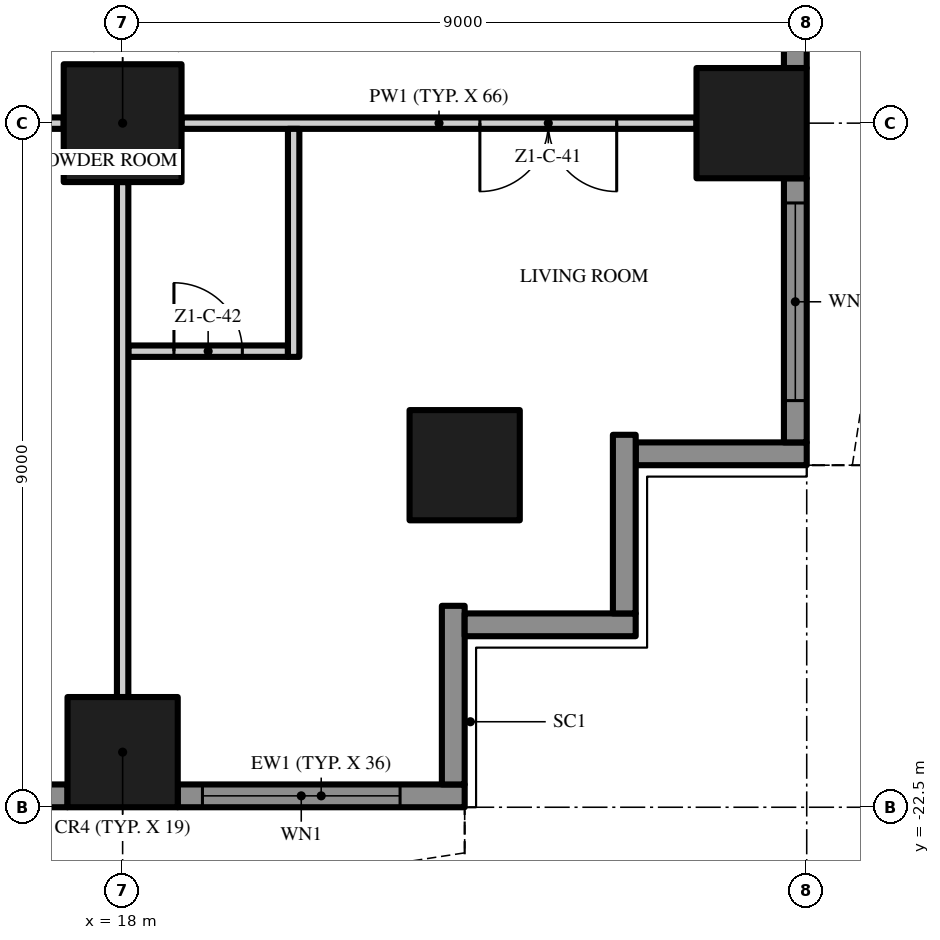
"""IFC4 building model, lengths in metres.
Left out: names, types, materials, properties, quantities, classifications, styles, units other than length and angle.
Written with IfcOpenShell. Run it as: python <this file> out.ifc"""

import sys

from ifc_helpers import new_model, si_unit, direction, frame, frame_2d, origin, origin_2d, place, context, subcontext, project, spatial, polyline, rectangle, outline, extrude, element, fill, save


model = new_model("IFC4")
c1 = context("Model", 3, precision=1e-05, world=origin(), true_north=direction((0.0, 1.0)))
c2 = subcontext(c1, "Body", "Model", "MODEL_VIEW")
j1 = project(units=[si_unit("LENGTHUNIT", "METRE"), si_unit("PLANEANGLEUNIT", "RADIAN")], contexts=[c1])
p1 = place(None, origin())
s1 = spatial("IfcSite", under=j1, at=p1, CompositionType="ELEMENT")
p2 = place(p1, origin())
s2 = spatial("IfcBuilding", under=s1, at=p2, CompositionType="ELEMENT")
p3 = place(p2, frame((0.0, 0.0, 37.8)))
s3 = spatial("IfcBuildingStorey", under=s2, at=p3, CompositionType="ELEMENT", Elevation=37.8)
p4 = place(p3, frame((18.0, -13.5, 0.0), z_axis=(0.0, 0.0, 1.0), x_axis=(1.0, 0.0, 0.0)))
e1 = element("IfcColumn", 1, at=p4, inside=s3, PredefinedType="COLUMN", context=c2, shape_type="SweptSolid", body=[
    extrude(rectangle(XDim=1.55, YDim=1.55, at=origin_2d()), origin(), (0.0, 0.0, 1.0), 3.5),
])
for number, where, z_axis, x_axis in (
    (2, (18.0, -21.775, 0.0), (0.0, 0.0, 1.0), (1.0, 0.0, 0.0)),
    (3, (26.275, -13.5, 0.0), (0.0, 0.0, 1.0), (1.0, 0.0, 0.0)),
    (4, (22.5, -18.0, 0.0), (0.0, 0.0, 1.0), (1.0, 0.0, 0.0)),
):
    element("IfcColumn", number, at=place(p3, frame(where, z_axis=z_axis, x_axis=x_axis)), inside=s3, PredefinedType="COLUMN", context=c2, shape_type="SweptSolid", body=[
        extrude(rectangle(XDim=1.45, YDim=1.45, at=origin_2d()), origin(), (0.0, 0.0, 1.0), 3.5),
    ])
p5 = place(p3, frame((17.275, -22.35, 0.0), z_axis=(0.0, 0.0, 1.0), x_axis=(-1.0, 0.0, 0.0)))
e5 = element("IfcWall", 5, at=p5, inside=s3, PredefinedType="SOLIDWALL", context=c2, shape_type="SweptSolid", body=[
    extrude(rectangle(XDim=7.55, YDim=0.3, at=frame_2d((3.775, 0.0))), origin(), (0.0, 0.0, 1.0), 3.5),
])
p6 = place(p5, frame((4.625, 0.0, 0.45)))
e6 = element("IfcOpeningElement", 6, at=p6, cuts=e5, PredefinedType="OPENING", context=c2, shape_type="SweptSolid", body=[
    extrude(rectangle(XDim=2.6, YDim=2.65, at=frame_2d((1.3, 1.325))), frame((0.0, 0.16, 0.0), z_axis=(0.0, -1.0, 0.0), x_axis=(1.0, 0.0, 0.0)), (0.0, 0.0, 1.0), 0.32),
])
p7 = place(p5, frame((0.325, 0.0, 0.0)))
e7 = element("IfcOpeningElement", 7, at=p7, cuts=e5, PredefinedType="OPENING", context=c2, shape_type="SweptSolid", body=[
    extrude(rectangle(XDim=2.6, YDim=2.4, at=frame_2d((1.3, 1.2))), frame((0.0, 0.16, 0.0), z_axis=(0.0, -1.0, 0.0), x_axis=(1.0, 0.0, 0.0)), (0.0, 0.0, 1.0), 0.32),
])
p8 = place(p3, frame((22.5, -22.35, 0.0), z_axis=(0.0, 0.0, 1.0), x_axis=(-1.0, 0.0, 0.0)))
e8 = element("IfcWall", 8, at=p8, inside=s3, PredefinedType="SOLIDWALL", context=c2, shape_type="SweptSolid", body=[
    extrude(rectangle(XDim=3.775, YDim=0.3, at=frame_2d((1.887, 0.0))), origin(), (0.0, 0.0, 1.0), 3.5),
])
p9 = place(p8, frame((0.85, 0.0, 0.45)))
e9 = element("IfcOpeningElement", 9, at=p9, cuts=e8, PredefinedType="OPENING", context=c2, shape_type="SweptSolid", body=[
    extrude(rectangle(XDim=2.6, YDim=2.65, at=frame_2d((1.3, 1.325))), frame((0.0, 0.16, 0.0), z_axis=(0.0, -1.0, 0.0), x_axis=(1.0, 0.0, 0.0)), (0.0, 0.0, 1.0), 0.32),
])
p10 = place(p3, frame((22.35, -19.85, 0.0), z_axis=(0.0, 0.0, 1.0), x_axis=(0.0, -1.0, 0.0)))
e10 = element("IfcWall", 10, at=p10, inside=s3, PredefinedType="SOLIDWALL", context=c2, shape_type="SweptSolid", body=[
    extrude(rectangle(XDim=2.35, YDim=0.3, at=frame_2d((1.175, 0.0))), origin(), (0.0, 0.0, 1.0), 3.5),
])
p11 = place(p3, frame((24.75, -20.1, 0.0), z_axis=(0.0, 0.0, 1.0), x_axis=(-1.0, 0.0, 0.0)))
e11 = element("IfcWall", 11, at=p11, inside=s3, PredefinedType="SOLIDWALL", context=c2, shape_type="SweptSolid", body=[
    extrude(rectangle(XDim=2.25, YDim=0.3, at=frame_2d((1.125, 0.0))), origin(), (0.0, 0.0, 1.0), 3.5),
])
p12 = place(p3, frame((24.6, -17.6, 0.0), z_axis=(0.0, 0.0, 1.0), x_axis=(0.0, -1.0, 0.0)))
e12 = element("IfcWall", 12, at=p12, inside=s3, PredefinedType="SOLIDWALL", context=c2, shape_type="SweptSolid", body=[
    extrude(rectangle(XDim=2.35, YDim=0.3, at=frame_2d((1.175, 0.0))), origin(), (0.0, 0.0, 1.0), 3.5),
])
p13 = place(p3, frame((27.0, -17.85, 0.0), z_axis=(0.0, 0.0, 1.0), x_axis=(-1.0, 0.0, 0.0)))
e13 = element("IfcWall", 13, at=p13, inside=s3, PredefinedType="SOLIDWALL", context=c2, shape_type="SweptSolid", body=[
    extrude(rectangle(XDim=2.25, YDim=0.3, at=frame_2d((1.125, 0.0))), origin(), (0.0, 0.0, 1.0), 3.5),
])
p14 = place(p3, frame((26.85, -14.225, 0.0), z_axis=(0.0, 0.0, 1.0), x_axis=(0.0, -1.0, 0.0)))
e14 = element("IfcWall", 14, at=p14, inside=s3, PredefinedType="SOLIDWALL", context=c2, shape_type="SweptSolid", body=[
    extrude(rectangle(XDim=3.475, YDim=0.3, at=frame_2d((1.738, 0.0))), origin(), (0.0, 0.0, 1.0), 3.5),
])
p15 = place(p14, frame((0.325, 0.0, 0.45)))
e15 = element("IfcOpeningElement", 15, at=p15, cuts=e14, PredefinedType="OPENING", context=c2, shape_type="SweptSolid", body=[
    extrude(rectangle(XDim=2.6, YDim=2.65, at=frame_2d((1.3, 1.325))), frame((0.0, 0.16, 0.0), z_axis=(0.0, -1.0, 0.0), x_axis=(1.0, 0.0, 0.0)), (0.0, 0.0, 1.0), 0.32),
])
p16 = place(p3, frame((26.85, -5.225, 0.0), z_axis=(0.0, 0.0, 1.0), x_axis=(0.0, -1.0, 0.0)))
e16 = element("IfcWall", 16, at=p16, inside=s3, PredefinedType="SOLIDWALL", context=c2, shape_type="SweptSolid", body=[
    extrude(rectangle(XDim=7.55, YDim=0.3, at=frame_2d((3.775, 0.0))), origin(), (0.0, 0.0, 1.0), 3.5),
])
p17 = place(p16, frame((4.625, 0.0, 0.0)))
e17 = element("IfcOpeningElement", 17, at=p17, cuts=e16, PredefinedType="OPENING", context=c2, shape_type="SweptSolid", body=[
    extrude(rectangle(XDim=2.6, YDim=2.4, at=frame_2d((1.3, 1.2))), frame((0.0, 0.16, 0.0), z_axis=(0.0, -1.0, 0.0), x_axis=(1.0, 0.0, 0.0)), (0.0, 0.0, 1.0), 0.32),
])
p18 = place(p16, frame((0.325, 0.0, 0.45)))
e18 = element("IfcOpeningElement", 18, at=p18, cuts=e16, PredefinedType="OPENING", context=c2, shape_type="SweptSolid", body=[
    extrude(rectangle(XDim=2.6, YDim=2.65, at=frame_2d((1.3, 1.325))), frame((0.0, 0.16, 0.0), z_axis=(0.0, -1.0, 0.0), x_axis=(1.0, 0.0, 0.0)), (0.0, 0.0, 1.0), 0.32),
])
p19 = place(p3, origin())
e19 = element("IfcWall", 19, at=p19, inside=s3, PredefinedType="USERDEFINED", context=c2, shape_type="SweptSolid", body=[
    extrude(outline(polyline([(-22.5, -23.1), (-21.0, -23.329), (-19.5, -23.929), (-18.0, -24.671), (-16.5, -25.271), (-15.0, -25.5), (-13.5, -25.271), (-12.0, -24.671), (-10.5, -23.929), (-9.0, -23.329), (-7.5, -23.1), (-6.0, -23.329), (-4.5, -23.929), (-3.0, -24.671), (-1.5, -25.271), (0.0, -25.5), (1.5, -25.271), (3.0, -24.671), (4.5, -23.929), (6.0, -23.329), (7.5, -23.1), (9.0, -23.329), (10.5, -23.929), (12.0, -24.671), (13.5, -25.271), (15.0, -25.5), (16.5, -25.271), (18.0, -24.671), (19.5, -23.929), (21.0, -23.329), (22.5, -23.1), (22.462, -22.853), (20.934, -23.086), (19.398, -23.701), (17.898, -24.442), (16.434, -25.028), (15.0, -25.247), (13.566, -25.028), (12.102, -24.442), (10.602, -23.701), (9.066, -23.086), (7.5, -22.847), (5.934, -23.086), (4.398, -23.701), (2.898, -24.442), (1.434, -25.028), (0.0, -25.247), (-1.434, -25.028), (-2.898, -24.442), (-4.398, -23.701), (-5.934, -23.086), (-7.5, -22.847), (-9.066, -23.086), (-10.602, -23.701), (-12.102, -24.442), (-13.566, -25.028), (-15.0, -25.247), (-16.434, -25.028), (-17.898, -24.442), (-19.398, -23.701), (-20.934, -23.086), (-22.462, -22.853), (-22.5, -23.1)])), origin(), (0.0, 0.0, 1.0), 0.9),
])
p20 = place(p3, origin())
e20 = element("IfcWall", 20, at=p20, inside=s3, PredefinedType="USERDEFINED", context=c2, shape_type="SweptSolid", body=[
    extrude(outline(polyline([(27.6, -18.0), (27.829, -16.5), (28.429, -15.0), (29.171, -13.5), (29.771, -12.0), (30.0, -10.5), (29.771, -9.0), (29.171, -7.5), (28.429, -6.0), (27.829, -4.5), (27.6, -3.0), (27.829, -1.5), (28.429, 0.0), (29.171, 1.5), (29.771, 3.0), (30.0, 4.5), (29.771, 6.0), (29.171, 7.5), (28.429, 9.0), (27.829, 10.5), (27.6, 12.0), (27.829, 13.5), (28.429, 15.0), (29.171, 16.5), (29.771, 18.0), (29.539, 18.093), (28.942, 16.602), (28.201, 15.102), (27.586, 13.566), (27.347, 12.0), (27.586, 10.434), (28.201, 8.898), (28.942, 7.398), (29.528, 5.934), (29.747, 4.5), (29.528, 3.066), (28.942, 1.602), (28.201, 0.102), (27.586, -1.434), (27.347, -3.0), (27.586, -4.566), (28.201, -6.102), (28.942, -7.602), (29.528, -9.066), (29.747, -10.5), (29.528, -11.934), (28.942, -13.398), (28.201, -14.898), (27.586, -16.434), (27.353, -17.962), (27.6, -18.0)])), origin(), (0.0, 0.0, 1.0), 0.9),
])
p21 = place(p3, frame((18.075, -16.5, 0.0), z_axis=(0.0, 0.0, 1.0), x_axis=(1.0, 0.0, 0.0)))
e21 = element("IfcWall", 21, at=p21, inside=s3, PredefinedType="PARTITIONING", context=c2, shape_type="SweptSolid", body=[
    extrude(rectangle(XDim=2.1, YDim=0.15, at=frame_2d((1.05, 0.0))), origin(), (0.0, 0.0, 1.0), 3.5),
])
p22 = place(p21, frame((0.6, 0.0, 0.0)))
e22 = element("IfcOpeningElement", 22, at=p22, cuts=e21, PredefinedType="OPENING", context=c2, shape_type="SweptSolid", body=[
    extrude(rectangle(XDim=0.9, YDim=2.1, at=frame_2d((0.45, 1.05))), frame((0.0, 0.085, 0.0), z_axis=(0.0, -1.0, 0.0), x_axis=(1.0, 0.0, 0.0)), (0.0, 0.0, 1.0), 0.17),
])
p23 = place(p3, frame((17.225, -13.5, 0.0), z_axis=(0.0, 0.0, 1.0), x_axis=(-1.0, 0.0, 0.0)))
e23 = element("IfcWall", 23, at=p23, inside=s3, PredefinedType="PARTITIONING", context=c2, shape_type="SweptSolid", body=[
    extrude(rectangle(XDim=7.45, YDim=0.15, at=frame_2d((3.725, 0.0))), origin(), (0.0, 0.0, 1.0), 3.5),
])
p24 = place(p23, frame((5.25, 0.0, 0.0)))
e24 = element("IfcOpeningElement", 24, at=p24, cuts=e23, PredefinedType="OPENING", context=c2, shape_type="SweptSolid", body=[
    extrude(rectangle(XDim=1.5, YDim=2.4, at=frame_2d((0.75, 1.2))), frame((0.0, 0.085, 0.0), z_axis=(0.0, -1.0, 0.0), x_axis=(1.0, 0.0, 0.0)), (0.0, 0.0, 1.0), 0.17),
])
p25 = place(p3, frame((25.55, -13.5, 0.0), z_axis=(0.0, 0.0, 1.0), x_axis=(-1.0, 0.0, 0.0)))
e25 = element("IfcWall", 25, at=p25, inside=s3, PredefinedType="PARTITIONING", context=c2, shape_type="SweptSolid", body=[
    extrude(rectangle(XDim=6.775, YDim=0.15, at=frame_2d((3.388, 0.0))), origin(), (0.0, 0.0, 1.0), 3.5),
])
p26 = place(p25, frame((1.05, 0.0, 0.0)))
e26 = element("IfcOpeningElement", 26, at=p26, cuts=e25, PredefinedType="OPENING", context=c2, shape_type="SweptSolid", body=[
    extrude(rectangle(XDim=1.8, YDim=2.4, at=frame_2d((0.9, 1.2))), frame((0.0, 0.085, 0.0), z_axis=(0.0, -1.0, 0.0), x_axis=(1.0, 0.0, 0.0)), (0.0, 0.0, 1.0), 0.17),
])
p27 = place(p3, frame((18.0, -21.05, 0.0), z_axis=(0.0, 0.0, 1.0), x_axis=(0.0, 1.0, 0.0)))
e27 = element("IfcWall", 27, at=p27, inside=s3, PredefinedType="PARTITIONING", context=c2, shape_type="SweptSolid", body=[
    extrude(rectangle(XDim=6.775, YDim=0.15, at=frame_2d((3.388, 0.0))), origin(), (0.0, 0.0, 1.0), 3.5),
])
p28 = place(p3, frame((20.25, -16.575, 0.0), z_axis=(0.0, 0.0, 1.0), x_axis=(0.0, 1.0, 0.0)))
e28 = element("IfcWall", 28, at=p28, inside=s3, PredefinedType="PARTITIONING", context=c2, shape_type="SweptSolid", body=[
    extrude(rectangle(XDim=3.0, YDim=0.15, at=frame_2d((1.5, 0.0))), origin(), (0.0, 0.0, 1.0), 3.5),
])
p29 = place(p9, origin())
e29 = element("IfcWindow", 29, at=p29, inside=s3, PartitioningType="SINGLE_PANEL", PredefinedType="WINDOW", context=c2, shape_type="SweptSolid", body=[
    extrude(rectangle(XDim=2.6, YDim=2.65, at=frame_2d((1.3, 1.325))), frame((0.0, 0.03, 0.0), z_axis=(0.0, -1.0, 0.0), x_axis=(1.0, 0.0, 0.0)), (0.0, 0.0, 1.0), 0.06),
])
fill(e9, e29)
p30 = place(p15, origin())
e30 = element("IfcWindow", 30, at=p30, inside=s3, PartitioningType="SINGLE_PANEL", PredefinedType="WINDOW", context=c2, shape_type="SweptSolid", body=[
    extrude(rectangle(XDim=2.6, YDim=2.65, at=frame_2d((1.3, 1.325))), frame((0.0, 0.03, 0.0), z_axis=(0.0, -1.0, 0.0), x_axis=(1.0, 0.0, 0.0)), (0.0, 0.0, 1.0), 0.06),
])
fill(e15, e30)
p31 = place(p26, origin())
e31 = element("IfcDoor", 31, at=p31, inside=s3, OperationType="DOUBLE_DOOR_SINGLE_SWING", PredefinedType="DOOR", context=c2, shape_type="SweptSolid", body=[
    extrude(rectangle(XDim=1.8, YDim=2.4, at=frame_2d((0.9, 1.2))), frame((0.0, 0.025, 0.0), z_axis=(0.0, -1.0, 0.0), x_axis=(1.0, 0.0, 0.0)), (0.0, 0.0, 1.0), 0.05),
])
fill(e26, e31)
p32 = place(p22, origin())
e32 = element("IfcDoor", 32, at=p32, inside=s3, OperationType="SINGLE_SWING_LEFT", PredefinedType="DOOR", context=c2, shape_type="SweptSolid", body=[
    extrude(rectangle(XDim=0.9, YDim=2.1, at=frame_2d((0.45, 1.05))), frame((0.0, 0.025, 0.0), z_axis=(0.0, -1.0, 0.0), x_axis=(1.0, 0.0, 0.0)), (0.0, 0.0, 1.0), 0.05),
])
fill(e22, e32)
save(model, sys.argv[1])
